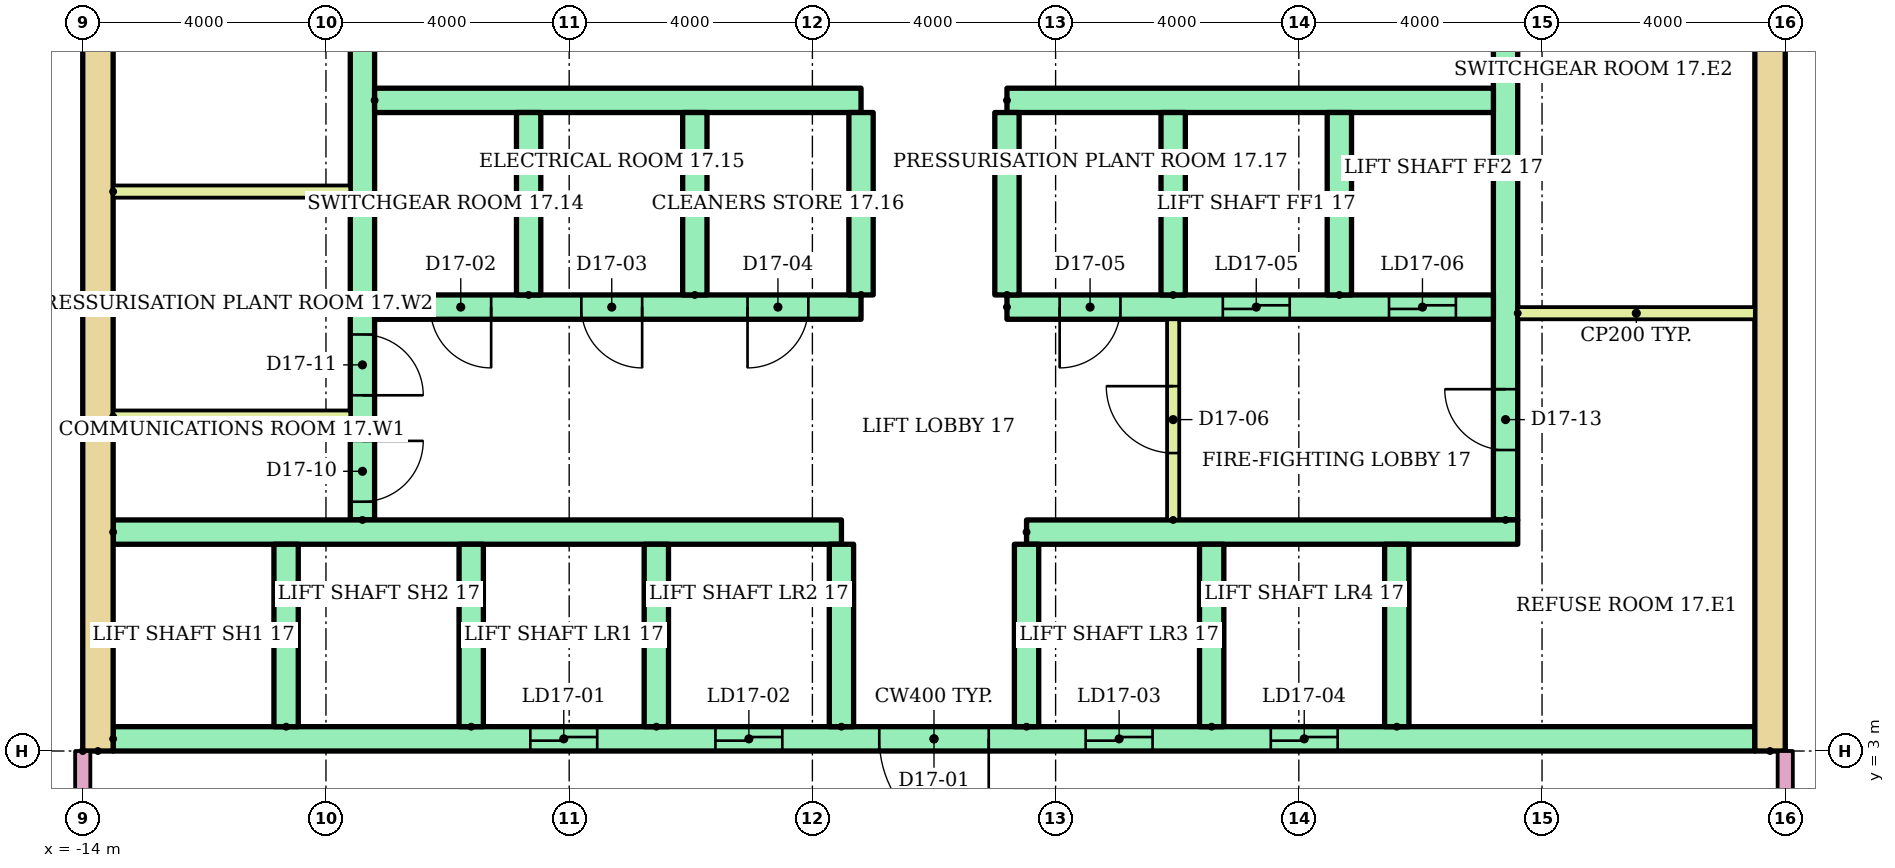
"""IFC4 building model, lengths in metres.
Left out: names, types, materials, properties, quantities, classifications, styles, units other than length and angle.
Written with IfcOpenShell. Run it as: python <this file> out.ifc"""

import sys

from ifc_helpers import new_model, si_unit, direction, frame, frame_2d, origin, place, context, subcontext, project, spatial, rectangle, extrude, element, fill, save


model = new_model("IFC4")
c1 = context("Model", 3, precision=1e-05, world=origin(), true_north=direction((0.0, 1.0)))
c2 = subcontext(c1, "Body", "Model", "MODEL_VIEW")
j1 = project(units=[si_unit("LENGTHUNIT", "METRE"), si_unit("PLANEANGLEUNIT", "RADIAN")], contexts=[c1])
p1 = place(None, origin())
s1 = spatial("IfcSite", under=j1, at=p1, CompositionType="ELEMENT")
p2 = place(p1, origin())
s2 = spatial("IfcBuilding", under=s1, at=p2, CompositionType="ELEMENT")
p3 = place(p2, frame((0.0, 0.0, 64.0)))
s3 = spatial("IfcBuildingStorey", under=s2, at=p3, CompositionType="ELEMENT", Elevation=64.0)
for number, where, z_axis, x_axis in (
    (1, (-13.75, 3.0, 0.0), (0.0, 0.0, 1.0), (0.0, 1.0, 0.0)),
    (2, (13.75, 3.0, 0.0), (0.0, 0.0, 1.0), (0.0, 1.0, 0.0)),
):
    element("IfcWall", number, at=place(p3, frame(where, z_axis=z_axis, x_axis=x_axis)), inside=s3, PredefinedType="SHEAR", context=c2, shape_type="SweptSolid", body=[
        extrude(rectangle(XDim=17.0, YDim=0.5, at=frame_2d((8.5, 0.0))), origin(), (0.0, 0.0, 1.0), 8.8),
    ])
p4 = place(p3, frame((-9.4, 6.8, 0.0), z_axis=(0.0, 0.0, 1.0), x_axis=(0.0, 1.0, 0.0)))
e3 = element("IfcWall", 3, at=p4, inside=s3, PredefinedType="SHEAR", context=c2, shape_type="SweptSolid", body=[
    extrude(rectangle(XDim=12.7, YDim=0.4, at=frame_2d((6.35, 0.0))), origin(), (0.0, 0.0, 1.0), 8.8),
])
p5 = place(p4, frame((0.3, 0.0, 0.0)))
e4 = element("IfcOpeningElement", 4, at=p5, cuts=e3, PredefinedType="OPENING", context=c2, shape_type="SweptSolid", body=[
    extrude(rectangle(XDim=1.0, YDim=2.1, at=frame_2d((0.5, 1.05))), frame((0.0, 0.21, 0.0), z_axis=(0.0, -1.0, 0.0), x_axis=(1.0, 0.0, 0.0)), (0.0, 0.0, 1.0), 0.42),
])
p6 = place(p4, frame((2.05, 0.0, 0.0)))
e5 = element("IfcOpeningElement", 5, at=p6, cuts=e3, PredefinedType="OPENING", context=c2, shape_type="SweptSolid", body=[
    extrude(rectangle(XDim=1.0, YDim=2.1, at=frame_2d((0.5, 1.05))), frame((0.0, 0.21, 0.0), z_axis=(0.0, -1.0, 0.0), x_axis=(1.0, 0.0, 0.0)), (0.0, 0.0, 1.0), 0.42),
])
p7 = place(p4, frame((7.925, 0.0, 0.0)))
e6 = element("IfcOpeningElement", 6, at=p7, cuts=e3, PredefinedType="OPENING", context=c2, shape_type="SweptSolid", body=[
    extrude(rectangle(XDim=1.0, YDim=2.1, at=frame_2d((0.5, 1.05))), frame((0.0, 0.21, 0.0), z_axis=(0.0, -1.0, 0.0), x_axis=(1.0, 0.0, 0.0)), (0.0, 0.0, 1.0), 0.42),
])
p8 = place(p3, frame((9.4, 6.8, 0.0), z_axis=(0.0, 0.0, 1.0), x_axis=(0.0, 1.0, 0.0)))
e7 = element("IfcWall", 7, at=p8, inside=s3, PredefinedType="SHEAR", context=c2, shape_type="SweptSolid", body=[
    extrude(rectangle(XDim=12.7, YDim=0.4, at=frame_2d((6.35, 0.0))), origin(), (0.0, 0.0, 1.0), 8.8),
])
p9 = place(p8, frame((1.15, 0.0, 0.0)))
e8 = element("IfcOpeningElement", 8, at=p9, cuts=e7, PredefinedType="OPENING", context=c2, shape_type="SweptSolid", body=[
    extrude(rectangle(XDim=1.0, YDim=2.1, at=frame_2d((0.5, 1.05))), frame((0.0, 0.21, 0.0), z_axis=(0.0, -1.0, 0.0), x_axis=(1.0, 0.0, 0.0)), (0.0, 0.0, 1.0), 0.42),
])
p10 = place(p8, frame((7.925, 0.0, 0.0)))
e9 = element("IfcOpeningElement", 9, at=p10, cuts=e7, PredefinedType="OPENING", context=c2, shape_type="SweptSolid", body=[
    extrude(rectangle(XDim=1.0, YDim=2.1, at=frame_2d((0.5, 1.05))), frame((0.0, 0.21, 0.0), z_axis=(0.0, -1.0, 0.0), x_axis=(1.0, 0.0, 0.0)), (0.0, 0.0, 1.0), 0.42),
])
p11 = place(p3, frame((-13.5, 3.2, 0.0)))
e10 = element("IfcWall", 10, at=p11, inside=s3, PredefinedType="SHEAR", context=c2, shape_type="SweptSolid", body=[
    extrude(rectangle(XDim=27.0, YDim=0.4, at=frame_2d((13.5, 0.0))), origin(), (0.0, 0.0, 1.0), 8.8),
])
p12 = place(p11, frame((6.861, 0.0, 0.0)))
e11 = element("IfcOpeningElement", 11, at=p12, cuts=e10, PredefinedType="OPENING", context=c2, shape_type="SweptSolid", body=[
    extrude(rectangle(XDim=1.1, YDim=2.1, at=frame_2d((0.55, 1.05))), frame((0.0, 0.21, 0.0), z_axis=(0.0, -1.0, 0.0), x_axis=(1.0, 0.0, 0.0)), (0.0, 0.0, 1.0), 0.42),
])
p13 = place(p11, frame((9.906, 0.0, 0.0)))
e12 = element("IfcOpeningElement", 12, at=p13, cuts=e10, PredefinedType="OPENING", context=c2, shape_type="SweptSolid", body=[
    extrude(rectangle(XDim=1.1, YDim=2.1, at=frame_2d((0.55, 1.05))), frame((0.0, 0.21, 0.0), z_axis=(0.0, -1.0, 0.0), x_axis=(1.0, 0.0, 0.0)), (0.0, 0.0, 1.0), 0.42),
])
p14 = place(p11, frame((15.994, 0.0, 0.0)))
e13 = element("IfcOpeningElement", 13, at=p14, cuts=e10, PredefinedType="OPENING", context=c2, shape_type="SweptSolid", body=[
    extrude(rectangle(XDim=1.1, YDim=2.1, at=frame_2d((0.55, 1.05))), frame((0.0, 0.21, 0.0), z_axis=(0.0, -1.0, 0.0), x_axis=(1.0, 0.0, 0.0)), (0.0, 0.0, 1.0), 0.42),
])
p15 = place(p11, frame((19.039, 0.0, 0.0)))
e14 = element("IfcOpeningElement", 14, at=p15, cuts=e10, PredefinedType="OPENING", context=c2, shape_type="SweptSolid", body=[
    extrude(rectangle(XDim=1.1, YDim=2.1, at=frame_2d((0.55, 1.05))), frame((0.0, 0.21, 0.0), z_axis=(0.0, -1.0, 0.0), x_axis=(1.0, 0.0, 0.0)), (0.0, 0.0, 1.0), 0.42),
])
p16 = place(p11, frame((12.6, 0.0, 0.0)))
e15 = element("IfcOpeningElement", 15, at=p16, cuts=e10, PredefinedType="OPENING", context=c2, shape_type="SweptSolid", body=[
    extrude(rectangle(XDim=1.8, YDim=2.1, at=frame_2d((0.9, 1.05))), frame((0.0, 0.21, 0.0), z_axis=(0.0, -1.0, 0.0), x_axis=(1.0, 0.0, 0.0)), (0.0, 0.0, 1.0), 0.42),
])
p17 = place(p3, frame((-13.5, 6.6, 0.0)))
e16 = element("IfcWall", 16, at=p17, inside=s3, PredefinedType="SHEAR", context=c2, shape_type="SweptSolid", body=[
    extrude(rectangle(XDim=11.978, YDim=0.4, at=frame_2d((5.989, 0.0))), origin(), (0.0, 0.0, 1.0), 8.8),
])
p18 = place(p3, frame((1.522, 6.6, 0.0)))
e17 = element("IfcWall", 17, at=p18, inside=s3, PredefinedType="SHEAR", context=c2, shape_type="SweptSolid", body=[
    extrude(rectangle(XDim=8.078, YDim=0.4, at=frame_2d((4.039, 0.0))), origin(), (0.0, 0.0, 1.0), 8.8),
])
for number, where, z_axis, x_axis in (
    (18, (-10.656, 3.4, 0.0), (0.0, 0.0, 1.0), (0.0, 1.0, 0.0)),
    (19, (-7.611, 3.4, 0.0), (0.0, 0.0, 1.0), (0.0, 1.0, 0.0)),
    (20, (-4.567, 3.4, 0.0), (0.0, 0.0, 1.0), (0.0, 1.0, 0.0)),
    (21, (-1.522, 3.4, 0.0), (0.0, 0.0, 1.0), (0.0, 1.0, 0.0)),
    (22, (1.522, 3.4, 0.0), (0.0, 0.0, 1.0), (0.0, 1.0, 0.0)),
    (23, (4.567, 3.4, 0.0), (0.0, 0.0, 1.0), (0.0, 1.0, 0.0)),
    (24, (7.611, 3.4, 0.0), (0.0, 0.0, 1.0), (0.0, 1.0, 0.0)),
):
    element("IfcWall", number, at=place(p3, frame(where, z_axis=z_axis, x_axis=x_axis)), inside=s3, PredefinedType="SHEAR", context=c2, shape_type="SweptSolid", body=[
        extrude(rectangle(XDim=3.0, YDim=0.4, at=frame_2d((1.5, 0.0))), origin(), (0.0, 0.0, 1.0), 8.8),
    ])
p19 = place(p3, frame((-9.2, 10.3, 0.0)))
e25 = element("IfcWall", 25, at=p19, inside=s3, PredefinedType="SHEAR", context=c2, shape_type="SweptSolid", body=[
    extrude(rectangle(XDim=8.0, YDim=0.4, at=frame_2d((4.0, 0.0))), origin(), (0.0, 0.0, 1.0), 8.8),
])
p20 = place(p19, frame((0.917, 0.0, 0.0)))
e26 = element("IfcOpeningElement", 26, at=p20, cuts=e25, PredefinedType="OPENING", context=c2, shape_type="SweptSolid", body=[
    extrude(rectangle(XDim=1.0, YDim=2.1, at=frame_2d((0.5, 1.05))), frame((0.0, 0.21, 0.0), z_axis=(0.0, -1.0, 0.0), x_axis=(1.0, 0.0, 0.0)), (0.0, 0.0, 1.0), 0.42),
])
p21 = place(p19, frame((3.4, 0.0, 0.0)))
e27 = element("IfcOpeningElement", 27, at=p21, cuts=e25, PredefinedType="OPENING", context=c2, shape_type="SweptSolid", body=[
    extrude(rectangle(XDim=1.0, YDim=2.1, at=frame_2d((0.5, 1.05))), frame((0.0, 0.21, 0.0), z_axis=(0.0, -1.0, 0.0), x_axis=(1.0, 0.0, 0.0)), (0.0, 0.0, 1.0), 0.42),
])
p22 = place(p19, frame((6.133, 0.0, 0.0)))
e28 = element("IfcOpeningElement", 28, at=p22, cuts=e25, PredefinedType="OPENING", context=c2, shape_type="SweptSolid", body=[
    extrude(rectangle(XDim=1.0, YDim=2.1, at=frame_2d((0.5, 1.05))), frame((0.0, 0.21, 0.0), z_axis=(0.0, -1.0, 0.0), x_axis=(1.0, 0.0, 0.0)), (0.0, 0.0, 1.0), 0.42),
])
p23 = place(p3, frame((-9.2, 13.7, 0.0)))
e29 = element("IfcWall", 29, at=p23, inside=s3, PredefinedType="SHEAR", context=c2, shape_type="SweptSolid", body=[
    extrude(rectangle(XDim=8.0, YDim=0.4, at=frame_2d((4.0, 0.0))), origin(), (0.0, 0.0, 1.0), 8.8),
])
p24 = place(p3, frame((1.2, 10.3, 0.0)))
e30 = element("IfcWall", 30, at=p24, inside=s3, PredefinedType="SHEAR", context=c2, shape_type="SweptSolid", body=[
    extrude(rectangle(XDim=8.0, YDim=0.4, at=frame_2d((4.0, 0.0))), origin(), (0.0, 0.0, 1.0), 8.8),
])
p25 = place(p24, frame((3.55, 0.0, 0.0)))
e31 = element("IfcOpeningElement", 31, at=p25, cuts=e30, PredefinedType="OPENING", context=c2, shape_type="SweptSolid", body=[
    extrude(rectangle(XDim=1.1, YDim=2.1, at=frame_2d((0.55, 1.05))), frame((0.0, 0.21, 0.0), z_axis=(0.0, -1.0, 0.0), x_axis=(1.0, 0.0, 0.0)), (0.0, 0.0, 1.0), 0.42),
])
p26 = place(p24, frame((6.283, 0.0, 0.0)))
e32 = element("IfcOpeningElement", 32, at=p26, cuts=e30, PredefinedType="OPENING", context=c2, shape_type="SweptSolid", body=[
    extrude(rectangle(XDim=1.1, YDim=2.1, at=frame_2d((0.55, 1.05))), frame((0.0, 0.21, 0.0), z_axis=(0.0, -1.0, 0.0), x_axis=(1.0, 0.0, 0.0)), (0.0, 0.0, 1.0), 0.42),
])
p27 = place(p24, frame((0.867, 0.0, 0.0)))
e33 = element("IfcOpeningElement", 33, at=p27, cuts=e30, PredefinedType="OPENING", context=c2, shape_type="SweptSolid", body=[
    extrude(rectangle(XDim=1.0, YDim=2.1, at=frame_2d((0.5, 1.05))), frame((0.0, 0.21, 0.0), z_axis=(0.0, -1.0, 0.0), x_axis=(1.0, 0.0, 0.0)), (0.0, 0.0, 1.0), 0.42),
])
p28 = place(p3, frame((1.2, 13.7, 0.0)))
e34 = element("IfcWall", 34, at=p28, inside=s3, PredefinedType="SHEAR", context=c2, shape_type="SweptSolid", body=[
    extrude(rectangle(XDim=8.0, YDim=0.4, at=frame_2d((4.0, 0.0))), origin(), (0.0, 0.0, 1.0), 8.8),
])
for number, where, z_axis, x_axis in (
    (35, (-6.667, 10.5, 0.0), (0.0, 0.0, 1.0), (0.0, 1.0, 0.0)),
    (36, (-3.933, 10.5, 0.0), (0.0, 0.0, 1.0), (0.0, 1.0, 0.0)),
    (37, (-1.2, 10.5, 0.0), (0.0, 0.0, 1.0), (0.0, 1.0, 0.0)),
    (38, (1.2, 10.5, 0.0), (0.0, 0.0, 1.0), (0.0, 1.0, 0.0)),
    (39, (3.933, 10.5, 0.0), (0.0, 0.0, 1.0), (0.0, 1.0, 0.0)),
    (40, (6.667, 10.5, 0.0), (0.0, 0.0, 1.0), (0.0, 1.0, 0.0)),
):
    element("IfcWall", number, at=place(p3, frame(where, z_axis=z_axis, x_axis=x_axis)), inside=s3, PredefinedType="SHEAR", context=c2, shape_type="SweptSolid", body=[
        extrude(rectangle(XDim=3.0, YDim=0.4, at=frame_2d((1.5, 0.0))), origin(), (0.0, 0.0, 1.0), 8.8),
    ])
p29 = place(p3, frame((3.933, 6.8, 0.0), z_axis=(0.0, 0.0, 1.0), x_axis=(0.0, 1.0, 0.0)))
e41 = element("IfcWall", 41, at=p29, inside=s3, PredefinedType="PARTITIONING", context=c2, shape_type="SweptSolid", body=[
    extrude(rectangle(XDim=3.3, YDim=0.2, at=frame_2d((1.65, 0.0))), origin(), (0.0, 0.0, 1.0), 8.8),
])
p30 = place(p29, frame((1.1, 0.0, 0.0)))
e42 = element("IfcOpeningElement", 42, at=p30, cuts=e41, PredefinedType="OPENING", context=c2, shape_type="SweptSolid", body=[
    extrude(rectangle(XDim=1.1, YDim=2.1, at=frame_2d((0.55, 1.05))), frame((0.0, 0.11, 0.0), z_axis=(0.0, -1.0, 0.0), x_axis=(1.0, 0.0, 0.0)), (0.0, 0.0, 1.0), 0.22),
])
for number, where in (
    (43, (-13.5, 8.5, 0.0)),
    (44, (-13.5, 12.2, 0.0)),
    (45, (9.6, 10.2, 0.0)),
):
    element("IfcWall", number, at=place(p3, frame(where)), inside=s3, PredefinedType="PARTITIONING", context=c2, shape_type="SweptSolid", body=[
        extrude(rectangle(XDim=3.9, YDim=0.2, at=frame_2d((1.95, 0.0))), origin(), (0.0, 0.0, 1.0), 8.8),
    ])
for number, where, z_axis, x_axis in (
    (46, (-14.0, 3.0, 0.0), (0.0, 0.0, 1.0), (0.0, -1.0, 0.0)),
    (47, (14.0, 1.4, 0.0), (0.0, 0.0, 1.0), (0.0, 1.0, 0.0)),
):
    element("IfcWall", number, at=place(p3, frame(where, z_axis=z_axis, x_axis=x_axis)), inside=s3, PredefinedType="PARTITIONING", context=c2, shape_type="SweptSolid", body=[
        extrude(rectangle(XDim=1.6, YDim=0.25, at=frame_2d((0.8, 0.0))), origin(), (0.0, 0.0, 1.0), 8.8),
    ])
p31 = place(p12, origin())
e48 = element("IfcDoor", 48, at=p31, inside=s3, OperationType="SLIDING_TO_LEFT", PredefinedType="DOOR", context=c2, shape_type="SweptSolid", body=[
    extrude(rectangle(XDim=1.1, YDim=2.1, at=frame_2d((0.55, 1.05))), frame((0.0, 0.025, 0.0), z_axis=(0.0, -1.0, 0.0), x_axis=(1.0, 0.0, 0.0)), (0.0, 0.0, 1.0), 0.05),
])
fill(e11, e48)
p32 = place(p13, origin())
e49 = element("IfcDoor", 49, at=p32, inside=s3, OperationType="SLIDING_TO_LEFT", PredefinedType="DOOR", context=c2, shape_type="SweptSolid", body=[
    extrude(rectangle(XDim=1.1, YDim=2.1, at=frame_2d((0.55, 1.05))), frame((0.0, 0.025, 0.0), z_axis=(0.0, -1.0, 0.0), x_axis=(1.0, 0.0, 0.0)), (0.0, 0.0, 1.0), 0.05),
])
fill(e12, e49)
p33 = place(p14, origin())
e50 = element("IfcDoor", 50, at=p33, inside=s3, OperationType="SLIDING_TO_LEFT", PredefinedType="DOOR", context=c2, shape_type="SweptSolid", body=[
    extrude(rectangle(XDim=1.1, YDim=2.1, at=frame_2d((0.55, 1.05))), frame((0.0, 0.025, 0.0), z_axis=(0.0, -1.0, 0.0), x_axis=(1.0, 0.0, 0.0)), (0.0, 0.0, 1.0), 0.05),
])
fill(e13, e50)
p34 = place(p15, origin())
e51 = element("IfcDoor", 51, at=p34, inside=s3, OperationType="SLIDING_TO_LEFT", PredefinedType="DOOR", context=c2, shape_type="SweptSolid", body=[
    extrude(rectangle(XDim=1.1, YDim=2.1, at=frame_2d((0.55, 1.05))), frame((0.0, 0.025, 0.0), z_axis=(0.0, -1.0, 0.0), x_axis=(1.0, 0.0, 0.0)), (0.0, 0.0, 1.0), 0.05),
])
fill(e14, e51)
p35 = place(p16, frame((1.8, 0.0, 0.0), z_axis=(0.0, 0.0, 1.0), x_axis=(-1.0, 0.0, 0.0)))
e52 = element("IfcDoor", 52, at=p35, inside=s3, OperationType="DOUBLE_DOOR_SINGLE_SWING", PredefinedType="DOOR", context=c2, shape_type="SweptSolid", body=[
    extrude(rectangle(XDim=1.8, YDim=2.1, at=frame_2d((0.9, 1.05))), frame((0.0, 0.025, 0.0), z_axis=(0.0, -1.0, 0.0), x_axis=(1.0, 0.0, 0.0)), (0.0, 0.0, 1.0), 0.05),
])
fill(e15, e52)
p36 = place(p25, origin())
e53 = element("IfcDoor", 53, at=p36, inside=s3, OperationType="SLIDING_TO_LEFT", PredefinedType="DOOR", context=c2, shape_type="SweptSolid", body=[
    extrude(rectangle(XDim=1.1, YDim=2.1, at=frame_2d((0.55, 1.05))), frame((0.0, 0.025, 0.0), z_axis=(0.0, -1.0, 0.0), x_axis=(1.0, 0.0, 0.0)), (0.0, 0.0, 1.0), 0.05),
])
fill(e31, e53)
p37 = place(p26, origin())
e54 = element("IfcDoor", 54, at=p37, inside=s3, OperationType="SLIDING_TO_LEFT", PredefinedType="DOOR", context=c2, shape_type="SweptSolid", body=[
    extrude(rectangle(XDim=1.1, YDim=2.1, at=frame_2d((0.55, 1.05))), frame((0.0, 0.025, 0.0), z_axis=(0.0, -1.0, 0.0), x_axis=(1.0, 0.0, 0.0)), (0.0, 0.0, 1.0), 0.05),
])
fill(e32, e54)
p38 = place(p20, frame((1.0, 0.0, 0.0), z_axis=(0.0, 0.0, 1.0), x_axis=(-1.0, 0.0, 0.0)))
e55 = element("IfcDoor", 55, at=p38, inside=s3, OperationType="SINGLE_SWING_RIGHT", PredefinedType="DOOR", context=c2, shape_type="SweptSolid", body=[
    extrude(rectangle(XDim=1.0, YDim=2.1, at=frame_2d((0.5, 1.05))), frame((0.0, 0.025, 0.0), z_axis=(0.0, -1.0, 0.0), x_axis=(1.0, 0.0, 0.0)), (0.0, 0.0, 1.0), 0.05),
])
fill(e26, e55)
p39 = place(p21, frame((1.0, 0.0, 0.0), z_axis=(0.0, 0.0, 1.0), x_axis=(-1.0, 0.0, 0.0)))
e56 = element("IfcDoor", 56, at=p39, inside=s3, OperationType="SINGLE_SWING_RIGHT", PredefinedType="DOOR", context=c2, shape_type="SweptSolid", body=[
    extrude(rectangle(XDim=1.0, YDim=2.1, at=frame_2d((0.5, 1.05))), frame((0.0, 0.025, 0.0), z_axis=(0.0, -1.0, 0.0), x_axis=(1.0, 0.0, 0.0)), (0.0, 0.0, 1.0), 0.05),
])
fill(e27, e56)
p40 = place(p22, frame((1.0, 0.0, 0.0), z_axis=(0.0, 0.0, 1.0), x_axis=(-1.0, 0.0, 0.0)))
e57 = element("IfcDoor", 57, at=p40, inside=s3, OperationType="SINGLE_SWING_LEFT", PredefinedType="DOOR", context=c2, shape_type="SweptSolid", body=[
    extrude(rectangle(XDim=1.0, YDim=2.1, at=frame_2d((0.5, 1.05))), frame((0.0, 0.025, 0.0), z_axis=(0.0, -1.0, 0.0), x_axis=(1.0, 0.0, 0.0)), (0.0, 0.0, 1.0), 0.05),
])
fill(e28, e57)
p41 = place(p27, frame((1.0, 0.0, 0.0), z_axis=(0.0, 0.0, 1.0), x_axis=(-1.0, 0.0, 0.0)))
e58 = element("IfcDoor", 58, at=p41, inside=s3, OperationType="SINGLE_SWING_LEFT", PredefinedType="DOOR", context=c2, shape_type="SweptSolid", body=[
    extrude(rectangle(XDim=1.0, YDim=2.1, at=frame_2d((0.5, 1.05))), frame((0.0, 0.025, 0.0), z_axis=(0.0, -1.0, 0.0), x_axis=(1.0, 0.0, 0.0)), (0.0, 0.0, 1.0), 0.05),
])
fill(e33, e58)
p42 = place(p30, origin())
e59 = element("IfcDoor", 59, at=p42, inside=s3, OperationType="SINGLE_SWING_RIGHT", PredefinedType="DOOR", context=c2, shape_type="SweptSolid", body=[
    extrude(rectangle(XDim=1.1, YDim=2.1, at=frame_2d((0.55, 1.05))), frame((0.0, 0.025, 0.0), z_axis=(0.0, -1.0, 0.0), x_axis=(1.0, 0.0, 0.0)), (0.0, 0.0, 1.0), 0.05),
])
fill(e42, e59)
p43 = place(p5, frame((1.0, 0.0, 0.0), z_axis=(0.0, 0.0, 1.0), x_axis=(-1.0, 0.0, 0.0)))
e60 = element("IfcDoor", 60, at=p43, inside=s3, OperationType="SINGLE_SWING_RIGHT", PredefinedType="DOOR", context=c2, shape_type="SweptSolid", body=[
    extrude(rectangle(XDim=1.0, YDim=2.1, at=frame_2d((0.5, 1.05))), frame((0.0, 0.025, 0.0), z_axis=(0.0, -1.0, 0.0), x_axis=(1.0, 0.0, 0.0)), (0.0, 0.0, 1.0), 0.05),
])
fill(e4, e60)
p44 = place(p6, frame((1.0, 0.0, 0.0), z_axis=(0.0, 0.0, 1.0), x_axis=(-1.0, 0.0, 0.0)))
e61 = element("IfcDoor", 61, at=p44, inside=s3, OperationType="SINGLE_SWING_LEFT", PredefinedType="DOOR", context=c2, shape_type="SweptSolid", body=[
    extrude(rectangle(XDim=1.0, YDim=2.1, at=frame_2d((0.5, 1.05))), frame((0.0, 0.025, 0.0), z_axis=(0.0, -1.0, 0.0), x_axis=(1.0, 0.0, 0.0)), (0.0, 0.0, 1.0), 0.05),
])
fill(e5, e61)
p45 = place(p9, origin())
e62 = element("IfcDoor", 62, at=p45, inside=s3, OperationType="SINGLE_SWING_RIGHT", PredefinedType="DOOR", context=c2, shape_type="SweptSolid", body=[
    extrude(rectangle(XDim=1.0, YDim=2.1, at=frame_2d((0.5, 1.05))), frame((0.0, 0.025, 0.0), z_axis=(0.0, -1.0, 0.0), x_axis=(1.0, 0.0, 0.0)), (0.0, 0.0, 1.0), 0.05),
])
fill(e8, e62)
save(model, sys.argv[1])
